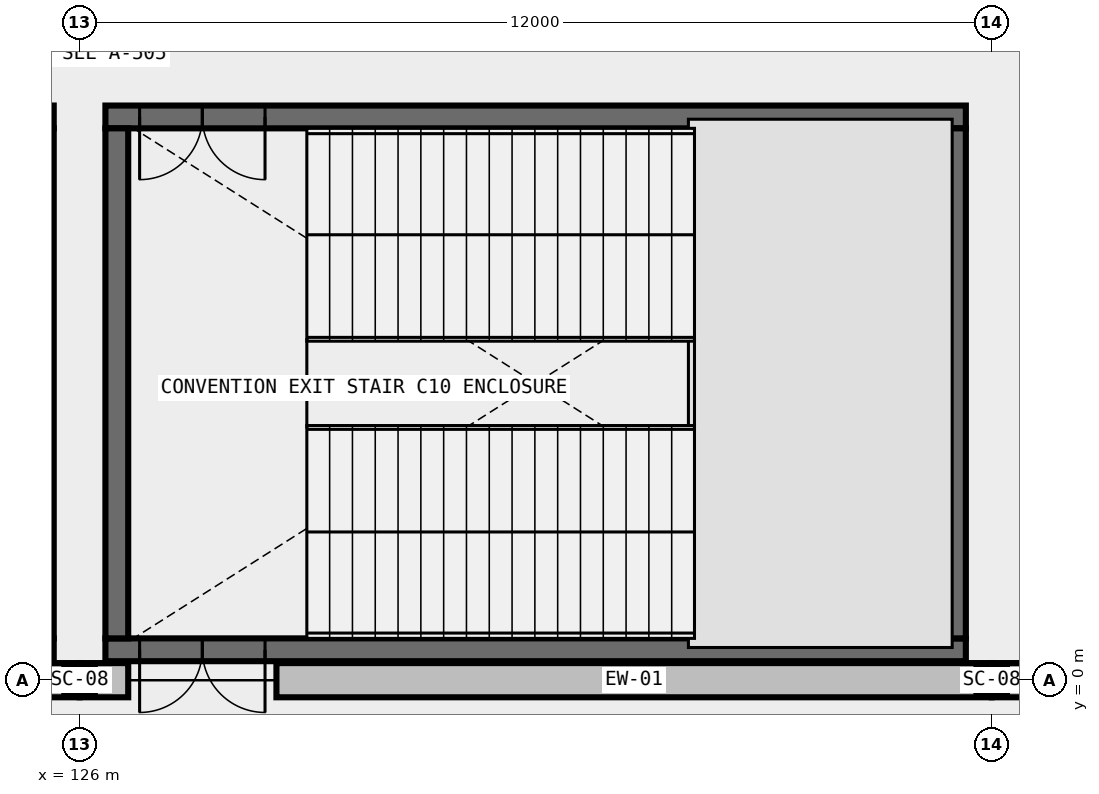
"""IFC4 building model, lengths in metres.
Left out: names, types, materials, properties, quantities, classifications, styles, units other than length and angle.
Written with IfcOpenShell. Run it as: python <this file> out.ifc"""

import sys

from ifc_helpers import new_model, si_unit, direction, frame, frame_2d, origin, origin_2d, place, context, subcontext, project, spatial, rectangle, i_section, extrude, element, fill, save


model = new_model("IFC4")
c1 = context("Model", 3, precision=1e-05, world=origin(), true_north=direction((0.0, 1.0)))
c2 = subcontext(c1, "Body", "Model", "MODEL_VIEW")
j1 = project(units=[si_unit("LENGTHUNIT", "METRE"), si_unit("PLANEANGLEUNIT", "RADIAN")], contexts=[c1])
p1 = place(None, origin())
s1 = spatial("IfcSite", under=j1, at=p1, CompositionType="ELEMENT")
p2 = place(p1, origin())
s2 = spatial("IfcBuilding", under=s1, at=p2, CompositionType="ELEMENT")
p3 = place(p2, origin())
s3 = spatial("IfcBuildingStorey", under=s2, at=p3, CompositionType="ELEMENT", Elevation=0.0)
for number, where, z_axis, x_axis in (
    (1, (126.0, 0.0, 0.0), (0.0, 0.0, 1.0), (1.0, 0.0, 0.0)),
    (2, (138.0, 0.0, 0.0), (0.0, 0.0, 1.0), (1.0, 0.0, 0.0)),
):
    element("IfcColumn", number, at=place(p3, frame(where, z_axis=z_axis, x_axis=x_axis)), inside=s3, PredefinedType="COLUMN", context=c2, shape_type="SweptSolid", body=[
        extrude(i_section(OverallWidth=0.401, OverallDepth=0.399, WebThickness=0.025, FlangeThickness=0.04, FilletRadius=0.031, at=origin_2d()), origin(), (0.0, 0.0, 1.0), 6.0),
    ])
p4 = place(p3, frame((125.66, 0.4, 0.0), z_axis=(0.0, 0.0, 1.0), x_axis=(-1.0, 0.0, 0.0)))
e3 = element("IfcWall", 3, at=p4, inside=s3, PredefinedType="SHEAR", context=c2, shape_type="SweptSolid", body=[
    extrude(rectangle(XDim=11.32, YDim=0.3, at=frame_2d((5.66, 0.0))), origin(), (0.0, 0.0, 1.0), 6.0),
])
p5 = place(p4, frame((9.22, 0.0, 0.0)))
e4 = element("IfcOpeningElement", 4, at=p5, cuts=e3, PredefinedType="OPENING", context=c2, shape_type="SweptSolid", body=[
    extrude(rectangle(XDim=1.65, YDim=2.25, at=frame_2d((0.825, 1.125))), frame((0.0, 0.165, 0.0), z_axis=(0.0, -1.0, 0.0), x_axis=(1.0, 0.0, 0.0)), (0.0, 0.0, 1.0), 0.33),
])
p6 = place(p3, frame((125.66, 7.41, 0.0), z_axis=(0.0, 0.0, 1.0), x_axis=(-1.0, 0.0, 0.0)))
e5 = element("IfcWall", 5, at=p6, inside=s3, PredefinedType="SHEAR", context=c2, shape_type="SweptSolid", body=[
    extrude(rectangle(XDim=11.32, YDim=0.3, at=frame_2d((5.66, 0.0))), origin(), (0.0, 0.0, 1.0), 6.0),
])
p7 = place(p6, frame((9.22, 0.0, 0.0)))
e6 = element("IfcOpeningElement", 6, at=p7, cuts=e5, PredefinedType="OPENING", context=c2, shape_type="SweptSolid", body=[
    extrude(rectangle(XDim=1.65, YDim=2.25, at=frame_2d((0.825, 1.125))), frame((0.0, 0.165, 0.0), z_axis=(0.0, -1.0, 0.0), x_axis=(1.0, 0.0, 0.0)), (0.0, 0.0, 1.0), 0.33),
])
p8 = place(p3, frame((125.51, 0.55, 0.0), z_axis=(0.0, 0.0, 1.0), x_axis=(0.0, 1.0, 0.0)))
e7 = element("IfcWall", 7, at=p8, inside=s3, PredefinedType="SHEAR", context=c2, shape_type="SweptSolid", body=[
    extrude(rectangle(XDim=6.71, YDim=0.3, at=frame_2d((3.355, 0.0))), origin(), (0.0, 0.0, 1.0), 6.0),
])
p9 = place(p3, frame((137.66, 0.4, 0.0), z_axis=(0.0, 0.0, 1.0), x_axis=(-1.0, 0.0, 0.0)))
e8 = element("IfcWall", 8, at=p9, inside=s3, PredefinedType="SHEAR", context=c2, shape_type="SweptSolid", body=[
    extrude(rectangle(XDim=11.32, YDim=0.3, at=frame_2d((5.66, 0.0))), origin(), (0.0, 0.0, 1.0), 6.0),
])
p10 = place(p9, frame((9.22, 0.0, 0.0)))
e9 = element("IfcOpeningElement", 9, at=p10, cuts=e8, PredefinedType="OPENING", context=c2, shape_type="SweptSolid", body=[
    extrude(rectangle(XDim=1.65, YDim=2.25, at=frame_2d((0.825, 1.125))), frame((0.0, 0.165, 0.0), z_axis=(0.0, -1.0, 0.0), x_axis=(1.0, 0.0, 0.0)), (0.0, 0.0, 1.0), 0.33),
])
p11 = place(p3, frame((137.66, 7.41, 0.0), z_axis=(0.0, 0.0, 1.0), x_axis=(-1.0, 0.0, 0.0)))
e10 = element("IfcWall", 10, at=p11, inside=s3, PredefinedType="SHEAR", context=c2, shape_type="SweptSolid", body=[
    extrude(rectangle(XDim=11.32, YDim=0.3, at=frame_2d((5.66, 0.0))), origin(), (0.0, 0.0, 1.0), 6.0),
])
p12 = place(p11, frame((9.22, 0.0, 0.0)))
e11 = element("IfcOpeningElement", 11, at=p12, cuts=e10, PredefinedType="OPENING", context=c2, shape_type="SweptSolid", body=[
    extrude(rectangle(XDim=1.65, YDim=2.25, at=frame_2d((0.825, 1.125))), frame((0.0, 0.165, 0.0), z_axis=(0.0, -1.0, 0.0), x_axis=(1.0, 0.0, 0.0)), (0.0, 0.0, 1.0), 0.33),
])
for number, where, z_axis, x_axis in (
    (12, (126.49, 7.26, 0.0), (0.0, 0.0, 1.0), (0.0, -1.0, 0.0)),
    (13, (137.51, 0.55, 0.0), (0.0, 0.0, 1.0), (0.0, 1.0, 0.0)),
):
    element("IfcWall", number, at=place(p3, frame(where, z_axis=z_axis, x_axis=x_axis)), inside=s3, PredefinedType="SHEAR", context=c2, shape_type="SweptSolid", body=[
        extrude(rectangle(XDim=6.71, YDim=0.3, at=frame_2d((3.355, 0.0))), origin(), (0.0, 0.0, 1.0), 6.0),
    ])
p13 = place(p3, frame((116.59, 0.0, 0.0), z_axis=(0.0, 0.0, 1.0), x_axis=(1.0, 0.0, 0.0)))
e14 = element("IfcWall", 14, at=p13, inside=s3, PredefinedType="STANDARD", context=c2, shape_type="SweptSolid", body=[
    extrude(rectangle(XDim=9.41, YDim=0.45, at=frame_2d((4.705, 0.0))), origin(), (0.0, 0.0, 1.0), 4.676),
])
p14 = place(p3, frame((126.0, 0.0, 0.0), z_axis=(0.0, 0.0, 1.0), x_axis=(1.0, 0.0, 0.0)))
e15 = element("IfcWall", 15, at=p14, inside=s3, PredefinedType="STANDARD", context=c2, shape_type="SweptSolid", body=[
    extrude(rectangle(XDim=0.64, YDim=0.45, at=frame_2d((0.32, 0.0))), origin(), (0.0, 0.0, 1.0), 4.676),
])
p15 = place(p3, frame((128.59, 0.0, 0.0), z_axis=(0.0, 0.0, 1.0), x_axis=(1.0, 0.0, 0.0)))
e16 = element("IfcWall", 16, at=p15, inside=s3, PredefinedType="STANDARD", context=c2, shape_type="SweptSolid", body=[
    extrude(rectangle(XDim=9.41, YDim=0.45, at=frame_2d((4.705, 0.0))), origin(), (0.0, 0.0, 1.0), 4.676),
])
p16 = place(p3, frame((138.0, 0.0, 0.0), z_axis=(0.0, 0.0, 1.0), x_axis=(1.0, 0.0, 0.0)))
e17 = element("IfcWall", 17, at=p16, inside=s3, PredefinedType="STANDARD", context=c2, shape_type="SweptSolid", body=[
    extrude(rectangle(XDim=9.0, YDim=0.45, at=frame_2d((4.5, 0.0))), origin(), (0.0, 0.0, 1.0), 4.676),
])
p17 = place(p16, frame((1.5, 0.0, 0.0)))
e18 = element("IfcOpeningElement", 18, at=p17, cuts=e17, PredefinedType="OPENING", context=c2, shape_type="SweptSolid", body=[
    extrude(rectangle(XDim=2.3, YDim=2.45, at=frame_2d((1.15, 1.225))), frame((0.0, 0.24, 0.0), z_axis=(0.0, -1.0, 0.0), x_axis=(1.0, 0.0, 0.0)), (0.0, 0.0, 1.0), 0.48),
])
p18 = place(p16, frame((5.83, 0.0, 0.0)))
e19 = element("IfcOpeningElement", 19, at=p18, cuts=e17, PredefinedType="OPENING", context=c2, shape_type="SweptSolid", body=[
    extrude(rectangle(XDim=2.2, YDim=2.4, at=frame_2d((1.1, 1.2))), frame((0.0, 0.24, 0.0), z_axis=(0.0, -1.0, 0.0), x_axis=(1.0, 0.0, 0.0)), (0.0, 0.0, 1.0), 0.48),
])
p19 = place(p12, origin())
e20 = element("IfcDoor", 20, at=p19, inside=s3, OperationType="DOUBLE_DOOR_SINGLE_SWING", PredefinedType="DOOR", context=c2, shape_type="SweptSolid", body=[
    extrude(rectangle(XDim=1.65, YDim=2.25, at=frame_2d((0.825, 1.125))), frame((0.0, 0.025, 0.0), z_axis=(0.0, -1.0, 0.0), x_axis=(1.0, 0.0, 0.0)), (0.0, 0.0, 1.0), 0.05),
])
fill(e11, e20)
p20 = place(p10, origin())
e21 = element("IfcDoor", 21, at=p20, inside=s3, OperationType="DOUBLE_DOOR_SINGLE_SWING", PredefinedType="DOOR", context=c2, shape_type="SweptSolid", body=[
    extrude(rectangle(XDim=1.65, YDim=2.25, at=frame_2d((0.825, 1.125))), frame((0.0, 0.025, 0.0), z_axis=(0.0, -1.0, 0.0), x_axis=(1.0, 0.0, 0.0)), (0.0, 0.0, 1.0), 0.05),
])
fill(e9, e21)
save(model, sys.argv[1])
